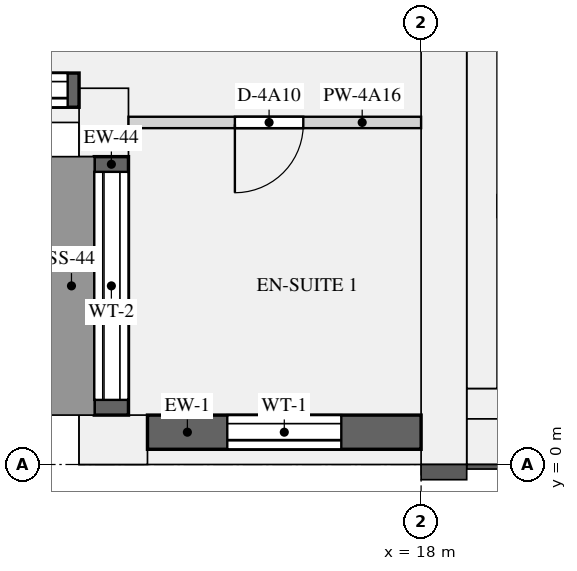
"""IFC4 building model, lengths in metres.
Left out: names, types, materials, properties, quantities, classifications, styles, units other than length and angle.
Written with IfcOpenShell. Run it as: python <this file> out.ifc"""

import sys

from ifc_helpers import new_model, si_unit, direction, frame, frame_2d, origin, origin_2d, place, context, subcontext, project, spatial, rectangle, extrude, element, fill, save


model = new_model("IFC4")
c1 = context("Model", 3, precision=1e-05, world=origin(), true_north=direction((0.0, 1.0)))
c2 = subcontext(c1, "Body", "Model", "MODEL_VIEW")
j1 = project(units=[si_unit("LENGTHUNIT", "METRE"), si_unit("PLANEANGLEUNIT", "RADIAN")], contexts=[c1])
p1 = place(None, origin())
s1 = spatial("IfcSite", under=j1, at=p1, CompositionType="ELEMENT")
p2 = place(p1, origin())
s2 = spatial("IfcBuilding", under=s1, at=p2, CompositionType="ELEMENT")
p3 = place(p2, frame((0.0, 0.0, 198.0)))
s3 = spatial("IfcBuildingStorey", under=s2, at=p3, CompositionType="ELEMENT", Elevation=198.0)
for number, where, z_axis, x_axis in (
    (1, (13.95, 0.325, 0.0), (0.0, 0.0, 1.0), (1.0, 0.0, 0.0)),
    (2, (13.825, 4.5, 0.0), (0.0, 0.0, 1.0), (0.0, -1.0, 0.0)),
):
    element("IfcColumn", number, at=place(p3, frame(where, z_axis=z_axis, x_axis=x_axis)), inside=s3, PredefinedType="USERDEFINED", context=c2, shape_type="SweptSolid", body=[
        extrude(rectangle(XDim=0.9, YDim=0.65, at=origin_2d()), origin(), (0.0, 0.0, 1.0), 3.15),
    ])
p4 = place(p3, frame((18.3, 0.0, 0.0), z_axis=(0.0, 0.0, 1.0), x_axis=(0.0, 1.0, 0.0)))
e3 = element("IfcWall", 3, at=p4, inside=s3, PredefinedType="SHEAR", context=c2, shape_type="SweptSolid", body=[
    extrude(rectangle(XDim=12.5, YDim=0.6, at=frame_2d((6.25, 0.0))), origin(), (0.0, 0.0, 1.0), 3.15),
])
p5 = place(p3, frame((18.6, 0.3, 0.0), z_axis=(0.0, 0.0, 1.0), x_axis=(1.0, 0.0, 0.0)))
e4 = element("IfcWall", 4, at=p5, inside=s3, PredefinedType="SHEAR", context=c2, shape_type="SweptSolid", body=[
    extrude(rectangle(XDim=34.8, YDim=0.6, at=frame_2d((17.4, 0.0))), origin(), (0.0, 0.0, 1.0), 3.15),
])
p6 = place(p3, frame((18.8, 1.0, 0.0), z_axis=(0.0, 0.0, 1.0), x_axis=(0.0, 1.0, 0.0)))
e5 = element("IfcWall", 5, at=p6, inside=s3, PredefinedType="SHEAR", context=c2, shape_type="SweptSolid", body=[
    extrude(rectangle(XDim=10.9, YDim=0.4, at=frame_2d((5.45, 0.0))), origin(), (0.0, 0.0, 1.0), 3.15),
])
p7 = place(p3, frame((18.6, 0.8, 0.0), z_axis=(0.0, 0.0, 1.0), x_axis=(1.0, 0.0, 0.0)))
e6 = element("IfcWall", 6, at=p7, inside=s3, PredefinedType="SHEAR", context=c2, shape_type="SweptSolid", body=[
    extrude(rectangle(XDim=34.8, YDim=0.4, at=frame_2d((17.4, 0.0))), origin(), (0.0, 0.0, 1.0), 3.15),
])
p8 = place(p3, frame((19.0, 3.4, 0.0), z_axis=(0.0, 0.0, 1.0), x_axis=(1.0, 0.0, 0.0)))
e7 = element("IfcWall", 7, at=p8, inside=s3, PredefinedType="SHEAR", context=c2, shape_type="SweptSolid", body=[
    extrude(rectangle(XDim=2.55, YDim=0.3, at=frame_2d((1.275, 0.0))), origin(), (0.0, 0.0, 1.0), 3.15),
])
p9 = place(p8, frame((0.675, 0.0, 0.0)))
e8 = element("IfcOpeningElement", 8, at=p9, cuts=e7, PredefinedType="OPENING", context=c2, shape_type="SweptSolid", body=[
    extrude(rectangle(XDim=1.2, YDim=2.1, at=frame_2d((0.6, 1.05))), frame((0.0, 0.16, 0.0), z_axis=(0.0, -1.0, 0.0), x_axis=(1.0, 0.0, 0.0)), (0.0, 0.0, 1.0), 0.32),
])
p10 = place(p3, frame((14.4, 0.425, 0.9), z_axis=(0.0, 0.0, 1.0), x_axis=(1.0, 0.0, 0.0)))
e9 = element("IfcWall", 9, at=p10, inside=s3, PredefinedType="SOLIDWALL", context=c2, shape_type="SweptSolid", body=[
    extrude(rectangle(XDim=3.6, YDim=0.45, at=frame_2d((1.8, 0.0))), origin(), (0.0, 0.0, 1.0), 1.93),
])
p11 = place(p10, frame((1.05, 0.0, 0.15)))
e10 = element("IfcOpeningElement", 10, at=p11, cuts=e9, PredefinedType="OPENING", context=c2, shape_type="SweptSolid", body=[
    extrude(rectangle(XDim=1.5, YDim=1.5, at=frame_2d((0.75, 0.75))), frame((0.0, 0.235, 0.0), z_axis=(0.0, -1.0, 0.0), x_axis=(1.0, 0.0, 0.0)), (0.0, 0.0, 1.0), 0.47),
])
p12 = place(p3, frame((9.9, 4.925, 0.9), z_axis=(0.0, 0.0, 1.0), x_axis=(1.0, 0.0, 0.0)))
e11 = element("IfcWall", 11, at=p12, inside=s3, PredefinedType="SOLIDWALL", context=c2, shape_type="SweptSolid", body=[
    extrude(rectangle(XDim=3.6, YDim=0.45, at=frame_2d((1.8, 0.0))), origin(), (0.0, 0.0, 1.0), 1.93),
])
p13 = place(p12, frame((0.15, 0.0, 0.15)))
e12 = element("IfcOpeningElement", 12, at=p13, cuts=e11, PredefinedType="OPENING", context=c2, shape_type="SweptSolid", body=[
    extrude(rectangle(XDim=3.3, YDim=1.5, at=frame_2d((1.65, 0.75))), frame((0.0, 0.235, 0.0), z_axis=(0.0, -1.0, 0.0), x_axis=(1.0, 0.0, 0.0)), (0.0, 0.0, 1.0), 0.47),
])
p14 = place(p3, frame((13.925, 4.05, 0.9), z_axis=(0.0, 0.0, 1.0), x_axis=(0.0, -1.0, 0.0)))
e13 = element("IfcWall", 13, at=p14, inside=s3, PredefinedType="SOLIDWALL", context=c2, shape_type="SweptSolid", body=[
    extrude(rectangle(XDim=3.4, YDim=0.45, at=frame_2d((1.7, 0.0))), origin(), (0.0, 0.0, 1.0), 1.93),
])
p15 = place(p14, frame((0.2, 0.0, 0.15)))
e14 = element("IfcOpeningElement", 14, at=p15, cuts=e13, PredefinedType="OPENING", context=c2, shape_type="SweptSolid", body=[
    extrude(rectangle(XDim=3.0, YDim=1.5, at=frame_2d((1.5, 0.75))), frame((0.0, 0.235, 0.0), z_axis=(0.0, -1.0, 0.0), x_axis=(1.0, 0.0, 0.0)), (0.0, 0.0, 1.0), 0.47),
])
p16 = place(p3, frame((14.15, 4.5, 0.0), z_axis=(0.0, 0.0, 1.0), x_axis=(1.0, 0.0, 0.0)))
e15 = element("IfcWall", 15, at=p16, inside=s3, PredefinedType="PARTITIONING", context=c2, shape_type="SweptSolid", body=[
    extrude(rectangle(XDim=3.85, YDim=0.15, at=frame_2d((1.925, 0.0))), origin(), (0.0, 0.0, 1.0), 2.83),
])
p17 = place(p16, frame((1.4, 0.0, 0.0)))
e16 = element("IfcOpeningElement", 16, at=p17, cuts=e15, PredefinedType="OPENING", context=c2, shape_type="SweptSolid", body=[
    extrude(rectangle(XDim=0.9, YDim=2.1, at=frame_2d((0.45, 1.05))), frame((0.0, 0.085, 0.0), z_axis=(0.0, -1.0, 0.0), x_axis=(1.0, 0.0, 0.0)), (0.0, 0.0, 1.0), 0.17),
])
p18 = place(p11, origin())
e17 = element("IfcWindow", 17, at=p18, inside=s3, PartitioningType="SINGLE_PANEL", PredefinedType="WINDOW", context=c2, shape_type="SweptSolid", body=[
    extrude(rectangle(XDim=1.5, YDim=1.5, at=frame_2d((0.75, 0.75))), frame((0.0, -0.065, 0.0), z_axis=(0.0, -1.0, 0.0), x_axis=(1.0, 0.0, 0.0)), (0.0, 0.0, 1.0), 0.06),
])
fill(e10, e17)
p19 = place(p13, origin())
e18 = element("IfcWindow", 18, at=p19, inside=s3, PartitioningType="SINGLE_PANEL", PredefinedType="WINDOW", context=c2, shape_type="SweptSolid", body=[
    extrude(rectangle(XDim=3.3, YDim=1.5, at=frame_2d((1.65, 0.75))), frame((0.0, -0.065, 0.0), z_axis=(0.0, -1.0, 0.0), x_axis=(1.0, 0.0, 0.0)), (0.0, 0.0, 1.0), 0.06),
])
fill(e12, e18)
p20 = place(p15, origin())
e19 = element("IfcWindow", 19, at=p20, inside=s3, PartitioningType="SINGLE_PANEL", PredefinedType="WINDOW", context=c2, shape_type="SweptSolid", body=[
    extrude(rectangle(XDim=3.0, YDim=1.5, at=frame_2d((1.5, 0.75))), frame((0.0, -0.065, 0.0), z_axis=(0.0, -1.0, 0.0), x_axis=(1.0, 0.0, 0.0)), (0.0, 0.0, 1.0), 0.06),
])
fill(e14, e19)
p21 = place(p17, frame((0.9, 0.0, 0.0), z_axis=(0.0, 0.0, 1.0), x_axis=(-1.0, 0.0, 0.0)))
e20 = element("IfcDoor", 20, at=p21, inside=s3, OperationType="SINGLE_SWING_RIGHT", PredefinedType="DOOR", context=c2, shape_type="SweptSolid", body=[
    extrude(rectangle(XDim=0.9, YDim=2.1, at=frame_2d((0.45, 1.05))), frame((0.0, 0.025, 0.0), z_axis=(0.0, -1.0, 0.0), x_axis=(1.0, 0.0, 0.0)), (0.0, 0.0, 1.0), 0.05),
])
fill(e16, e20)
save(model, sys.argv[1])
